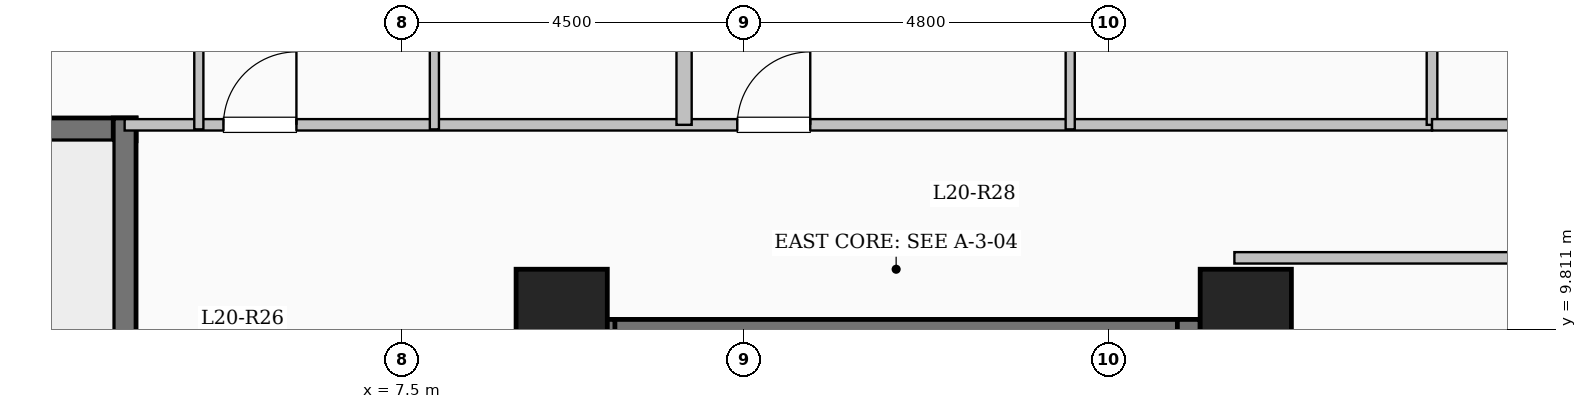
"""IFC4 building model, lengths in metres.
Left out: names, types, materials, properties, quantities, classifications, styles, units other than length and angle.
Written with IfcOpenShell. Run it as: python <this file> out.ifc"""

import sys

from ifc_helpers import new_model, si_unit, direction, frame, frame_2d, origin, origin_2d, place, context, subcontext, project, spatial, rectangle, extrude, element, fill, save


model = new_model("IFC4")
c1 = context("Model", 3, precision=1e-05, world=origin(), true_north=direction((0.0, 1.0)))
c2 = subcontext(c1, "Body", "Model", "MODEL_VIEW")
j1 = project(units=[si_unit("LENGTHUNIT", "METRE"), si_unit("PLANEANGLEUNIT", "RADIAN")], contexts=[c1])
p1 = place(None, origin())
s1 = spatial("IfcSite", under=j1, at=p1, CompositionType="ELEMENT")
p2 = place(p1, origin())
s2 = spatial("IfcBuilding", under=s1, at=p2, CompositionType="ELEMENT")
p3 = place(p2, frame((0.0, 0.0, 78.3)))
s3 = spatial("IfcBuildingStorey", under=s2, at=p3, CompositionType="ELEMENT", Elevation=78.3)
for number, where, z_axis, x_axis in (
    (1, (9.6, 10.0, 0.0), (0.0, 0.0, 1.0), (1.0, 0.0, 0.0)),
    (2, (18.6, 10.0, 0.0), (0.0, 0.0, 1.0), (1.0, 0.0, 0.0)),
):
    element("IfcColumn", number, at=place(p3, frame(where, z_axis=z_axis, x_axis=x_axis)), inside=s3, PredefinedType="COLUMN", context=c2, shape_type="SweptSolid", body=[
        extrude(rectangle(XDim=1.2, YDim=1.2, at=origin_2d()), origin(), (0.0, 0.0, 1.0), 3.35),
    ])
p4 = place(p3, frame((10.0, 9.79, 0.0), z_axis=(0.0, 0.0, 1.0), x_axis=(1.0, 0.0, 0.0)))
e3 = element("IfcWall", 3, at=p4, inside=s3, PredefinedType="SHEAR", context=c2, shape_type="SweptSolid", body=[
    extrude(rectangle(XDim=8.0, YDim=0.3, at=frame_2d((4.0, 0.0))), origin(), (0.0, 0.0, 1.0), 3.35),
])
for number, where, z_axis, x_axis in (
    (4, (10.15, 6.35, 0.0), (0.0, 0.0, 1.0), (0.0, 1.0, 0.0)),
    (5, (17.85, 6.35, 0.0), (0.0, 0.0, 1.0), (0.0, 1.0, 0.0)),
):
    element("IfcWall", number, at=place(p3, frame(where, z_axis=z_axis, x_axis=x_axis)), inside=s3, PredefinedType="SHEAR", context=c2, shape_type="SweptSolid", body=[
        extrude(rectangle(XDim=3.59, YDim=0.3, at=frame_2d((1.795, 0.0))), origin(), (0.0, 0.0, 1.0), 3.35),
    ])
p5 = place(p3, frame((-4.0, 12.44, 0.0), z_axis=(0.0, 0.0, 1.0), x_axis=(1.0, 0.0, 0.0)))
e6 = element("IfcWall", 6, at=p5, inside=s3, PredefinedType="SHEAR", context=c2, shape_type="SweptSolid", body=[
    extrude(rectangle(XDim=8.0, YDim=0.3, at=frame_2d((4.0, 0.0))), origin(), (0.0, 0.0, 1.0), 3.35),
])
p6 = place(p3, frame((3.85, 9.0, 0.0), z_axis=(0.0, 0.0, 1.0), x_axis=(0.0, 1.0, 0.0)))
e7 = element("IfcWall", 7, at=p6, inside=s3, PredefinedType="SHEAR", context=c2, shape_type="SweptSolid", body=[
    extrude(rectangle(XDim=3.59, YDim=0.3, at=frame_2d((1.795, 0.0))), origin(), (0.0, 0.0, 1.0), 3.35),
])
p7 = place(p3, frame((3.85, 12.5, 0.0), z_axis=(0.0, 0.0, 1.0), x_axis=(1.0, 0.0, 0.0)))
e8 = element("IfcWall", 8, at=p7, inside=s3, PredefinedType="PARTITIONING", context=c2, shape_type="SweptSolid", body=[
    extrude(rectangle(XDim=17.2, YDim=0.15, at=frame_2d((8.6, 0.0))), origin(), (0.0, 0.0, 1.0), 3.1),
])
p8 = place(p7, frame((1.3, 0.0, 0.0)))
e9 = element("IfcOpeningElement", 9, at=p8, cuts=e8, PredefinedType="OPENING", context=c2, shape_type="SweptSolid", body=[
    extrude(rectangle(XDim=0.96, YDim=2.15, at=frame_2d((0.48, 1.075))), frame((0.0, 0.085, 0.0), z_axis=(0.0, -1.0, 0.0), x_axis=(1.0, 0.0, 0.0)), (0.0, 0.0, 1.0), 0.17),
])
p9 = place(p7, frame((8.06, 0.0, 0.0)))
e10 = element("IfcOpeningElement", 10, at=p9, cuts=e8, PredefinedType="OPENING", context=c2, shape_type="SweptSolid", body=[
    extrude(rectangle(XDim=0.96, YDim=2.15, at=frame_2d((0.48, 1.075))), frame((0.0, 0.085, 0.0), z_axis=(0.0, -1.0, 0.0), x_axis=(1.0, 0.0, 0.0)), (0.0, 0.0, 1.0), 0.17),
])
p10 = place(p3, frame((11.21, 12.5, 0.0), z_axis=(0.0, 0.0, 1.0), x_axis=(0.0, 1.0, 0.0)))
e11 = element("IfcWall", 11, at=p10, inside=s3, PredefinedType="SOLIDWALL", context=c2, shape_type="SweptSolid", body=[
    extrude(rectangle(XDim=9.6, YDim=0.2, at=frame_2d((4.8, 0.0))), origin(), (0.0, 0.0, 1.0), 3.1),
])
p11 = place(p3, frame((4.826, 12.44, 0.0), z_axis=(0.0, 0.0, 1.0), x_axis=(0.0, 1.0, 0.0)))
e12 = element("IfcWall", 12, at=p11, inside=s3, PredefinedType="PARTITIONING", context=c2, shape_type="SweptSolid", body=[
    extrude(rectangle(XDim=11.14, YDim=0.12, at=frame_2d((5.57, 0.0))), origin(), (0.0, 0.0, 1.0), 3.1),
])
p12 = place(p11, frame((3.245, 0.0, 0.0)))
e13 = element("IfcOpeningElement", 13, at=p12, cuts=e12, PredefinedType="OPENING", context=c2, shape_type="SweptSolid", body=[
    extrude(rectangle(XDim=1.08, YDim=2.15, at=frame_2d((0.54, 1.075))), frame((0.0, 0.07, 0.0), z_axis=(0.0, -1.0, 0.0), x_axis=(1.0, 0.0, 0.0)), (0.0, 0.0, 1.0), 0.14),
])
p13 = place(p3, frame((7.925, 12.44, 0.0), z_axis=(0.0, 0.0, 1.0), x_axis=(0.0, 1.0, 0.0)))
e14 = element("IfcWall", 14, at=p13, inside=s3, PredefinedType="PARTITIONING", context=c2, shape_type="SweptSolid", body=[
    extrude(rectangle(XDim=2.96, YDim=0.12, at=frame_2d((1.48, 0.0))), origin(), (0.0, 0.0, 1.0), 2.435),
])
p14 = place(p3, frame((16.29, 12.44, 0.0), z_axis=(0.0, 0.0, 1.0), x_axis=(0.0, 1.0, 0.0)))
e15 = element("IfcWall", 15, at=p14, inside=s3, PredefinedType="PARTITIONING", context=c2, shape_type="SweptSolid", body=[
    extrude(rectangle(XDim=3.21, YDim=0.12, at=frame_2d((1.605, 0.0))), origin(), (0.0, 0.0, 1.0), 3.1),
])
p15 = place(p14, frame((1.195, 0.0, 0.0)))
e16 = element("IfcOpeningElement", 16, at=p15, cuts=e15, PredefinedType="OPENING", context=c2, shape_type="SweptSolid", body=[
    extrude(rectangle(XDim=0.88, YDim=2.1, at=frame_2d((0.44, 1.05))), frame((0.0, 0.07, 0.0), z_axis=(0.0, -1.0, 0.0), x_axis=(1.0, 0.0, 0.0)), (0.0, 0.0, 1.0), 0.14),
])
p16 = place(p3, frame((18.45, 10.75, 0.0), z_axis=(0.0, 0.0, 1.0), x_axis=(1.0, 0.0, 0.0)))
e17 = element("IfcWall", 17, at=p16, inside=s3, PredefinedType="PARTITIONING", context=c2, shape_type="SweptSolid", body=[
    extrude(rectangle(XDim=8.43, YDim=0.15, at=frame_2d((4.215, 0.0))), origin(), (0.0, 0.0, 1.0), 3.1),
])
p17 = place(p3, frame((21.05, 12.5, 0.0), z_axis=(0.0, 0.0, 1.0), x_axis=(0.0, 1.0, 0.0)))
e18 = element("IfcWall", 18, at=p17, inside=s3, PredefinedType="PARTITIONING", context=c2, shape_type="SweptSolid", body=[
    extrude(rectangle(XDim=5.35, YDim=0.14, at=frame_2d((2.675, 0.0))), origin(), (0.0, 0.0, 1.0), 3.1),
])
p18 = place(p3, frame((21.05, 12.5, 0.0), z_axis=(0.0, 0.0, 1.0), x_axis=(1.0, 0.0, 0.0)))
e19 = element("IfcWall", 19, at=p18, inside=s3, PredefinedType="PARTITIONING", context=c2, shape_type="SweptSolid", body=[
    extrude(rectangle(XDim=5.83, YDim=0.15, at=frame_2d((2.915, 0.0))), origin(), (0.0, 0.0, 1.0), 3.1),
])
p19 = place(p18, frame((2.44, 0.0, 0.0)))
e20 = element("IfcOpeningElement", 20, at=p19, cuts=e19, PredefinedType="OPENING", context=c2, shape_type="SweptSolid", body=[
    extrude(rectangle(XDim=0.95, YDim=2.15, at=frame_2d((0.475, 1.075))), frame((0.0, 0.085, 0.0), z_axis=(0.0, -1.0, 0.0), x_axis=(1.0, 0.0, 0.0)), (0.0, 0.0, 1.0), 0.17),
])
p20 = place(p8, origin())
e21 = element("IfcDoor", 21, at=p20, inside=s3, OperationType="SINGLE_SWING_RIGHT", PredefinedType="DOOR", context=c2, shape_type="SweptSolid", body=[
    extrude(rectangle(XDim=0.96, YDim=2.15, at=frame_2d((0.48, 1.075))), frame((0.0, 0.025, 0.0), z_axis=(0.0, -1.0, 0.0), x_axis=(1.0, 0.0, 0.0)), (0.0, 0.0, 1.0), 0.05),
])
fill(e9, e21)
p21 = place(p9, origin())
e22 = element("IfcDoor", 22, at=p21, inside=s3, OperationType="SINGLE_SWING_RIGHT", PredefinedType="DOOR", context=c2, shape_type="SweptSolid", body=[
    extrude(rectangle(XDim=0.96, YDim=2.15, at=frame_2d((0.48, 1.075))), frame((0.0, 0.025, 0.0), z_axis=(0.0, -1.0, 0.0), x_axis=(1.0, 0.0, 0.0)), (0.0, 0.0, 1.0), 0.05),
])
fill(e10, e22)
save(model, sys.argv[1])
